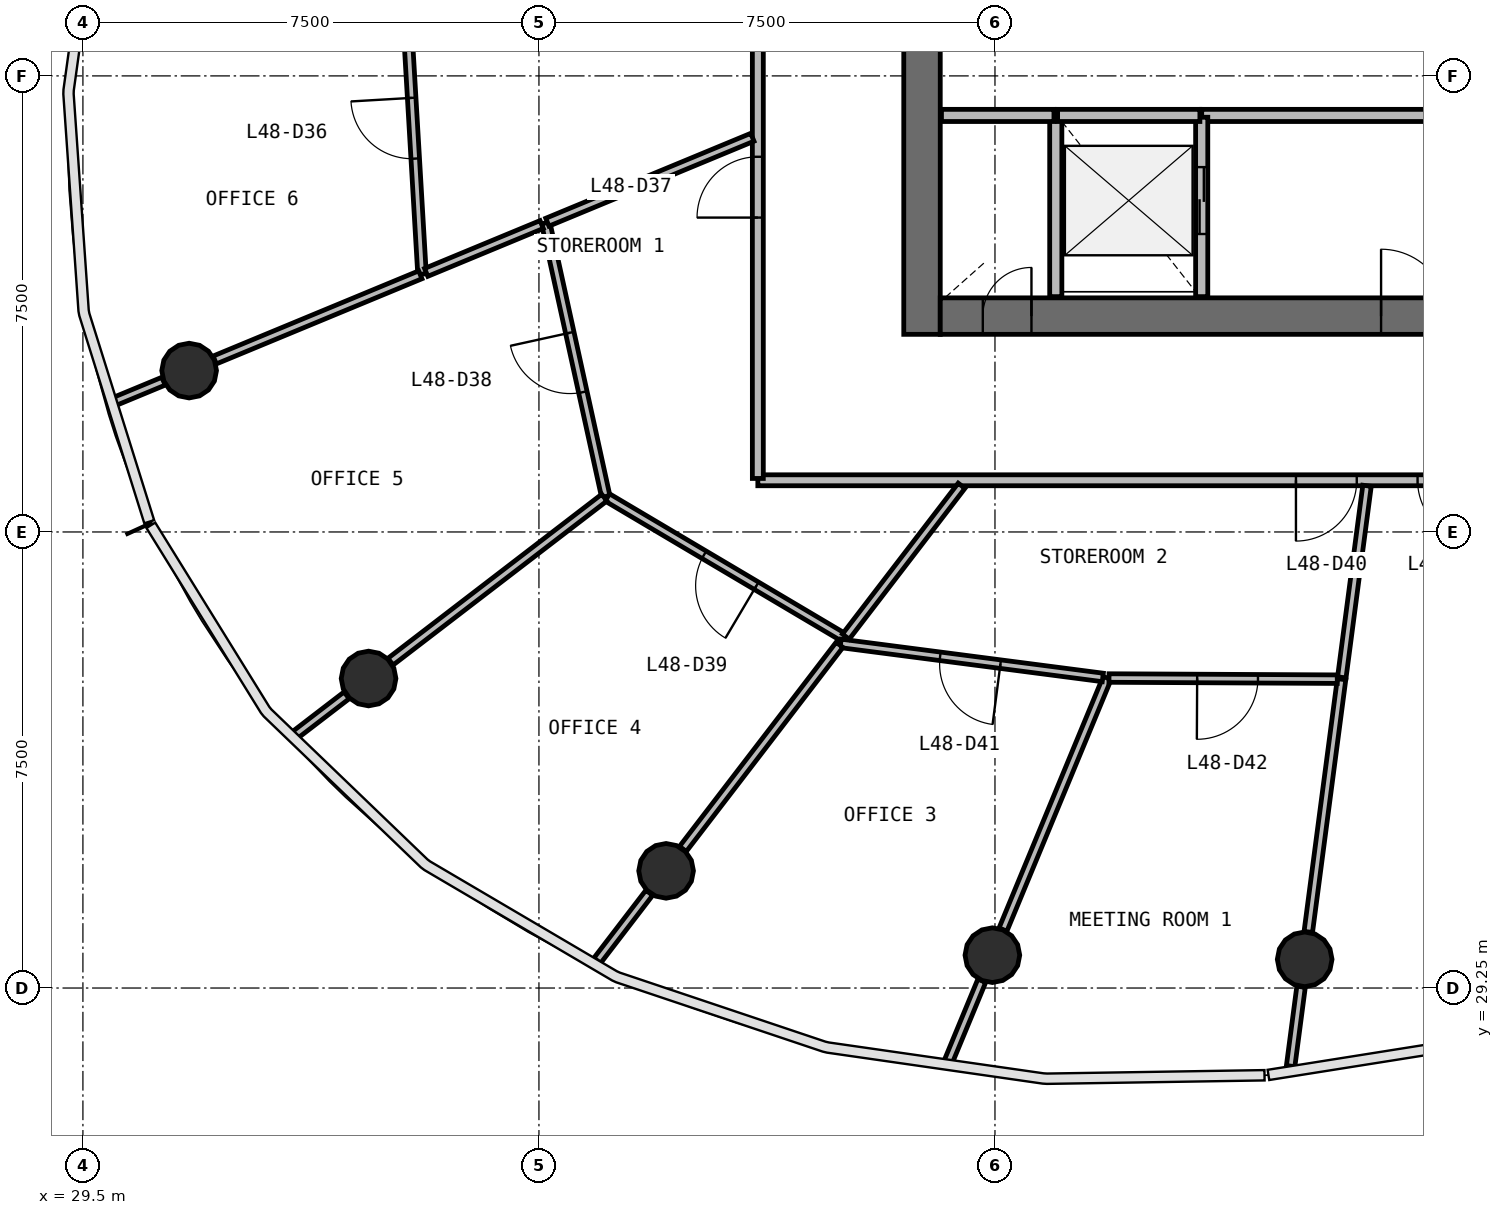
"""IFC4 building model, lengths in metres.
Left out: names, types, materials, properties, quantities, classifications, styles, units other than length and angle.
Written with IfcOpenShell. Run it as: python <this file> out.ifc"""

import sys

from ifc_helpers import new_model, si_unit, direction, frame, frame_2d, origin, origin_2d, place, context, subcontext, project, spatial, rectangle, circle, extrude, source, transform, mapped, element, fill, save


model = new_model("IFC4")
c1 = context("Model", 3, precision=1e-05, world=origin(), true_north=direction((0.0, 1.0)))
c2 = subcontext(c1, "Body", "Model", "MODEL_VIEW")
j1 = project(units=[si_unit("LENGTHUNIT", "METRE"), si_unit("PLANEANGLEUNIT", "RADIAN")], contexts=[c1])
p1 = place(None, origin())
s1 = spatial("IfcSite", under=j1, at=p1, CompositionType="ELEMENT")
p2 = place(p1, origin())
s2 = spatial("IfcBuilding", under=s1, at=p2, CompositionType="ELEMENT")
p3 = place(p2, frame((0.0, 0.0, 199.4)))
s3 = spatial("IfcBuildingStorey", under=s2, at=p3, CompositionType="ELEMENT", Elevation=199.4)
p4 = place(p3, frame((43.3, 56.0, 0.0), z_axis=(0.0, 0.0, 1.0), x_axis=(0.0, -1.0, 0.0)))
e1 = element("IfcWall", 1, at=p4, inside=s3, PredefinedType="SHEAR", context=c2, shape_type="SweptSolid", body=[
    extrude(rectangle(XDim=16.0, YDim=0.6, at=frame_2d((8.0, 0.0))), origin(), (0.0, 0.0, 1.0), 3.9),
])
p5 = place(p4, frame((7.1, 0.0, 0.0)))
e2 = element("IfcOpeningElement", 2, at=p5, cuts=e1, PredefinedType="OPENING", context=c2, shape_type="SweptSolid", body=[
    extrude(rectangle(XDim=1.8, YDim=2.1, at=frame_2d((0.9, 1.05))), frame((0.0, 0.31, 0.0), z_axis=(0.0, -1.0, 0.0), x_axis=(1.0, 0.0, 0.0)), (0.0, 0.0, 1.0), 0.62),
])
p6 = place(p3, frame((43.6, 40.3, 0.0), z_axis=(0.0, 0.0, 1.0), x_axis=(1.0, 0.0, 0.0)))
e3 = element("IfcWall", 3, at=p6, inside=s3, PredefinedType="SHEAR", context=c2, shape_type="SweptSolid", body=[
    extrude(rectangle(XDim=16.8, YDim=0.6, at=frame_2d((8.4, 0.0))), origin(), (0.0, 0.0, 1.0), 3.9),
])
p7 = place(p6, frame((10.3, 0.0, 0.0)))
e4 = element("IfcOpeningElement", 4, at=p7, cuts=e3, PredefinedType="OPENING", context=c2, shape_type="SweptSolid", body=[
    extrude(rectangle(XDim=1.2, YDim=2.1, at=frame_2d((0.6, 1.05))), frame((0.0, 0.31, 0.0), z_axis=(0.0, -1.0, 0.0), x_axis=(1.0, 0.0, 0.0)), (0.0, 0.0, 1.0), 0.62),
])
p8 = place(p6, frame((7.25, 0.0, 0.0)))
e5 = element("IfcOpeningElement", 5, at=p8, cuts=e3, PredefinedType="OPENING", context=c2, shape_type="SweptSolid", body=[
    extrude(rectangle(XDim=1.1, YDim=2.1, at=frame_2d((0.55, 1.05))), frame((0.0, 0.31, 0.0), z_axis=(0.0, -1.0, 0.0), x_axis=(1.0, 0.0, 0.0)), (0.0, 0.0, 1.0), 0.62),
])
p9 = place(p6, frame((0.7, 0.0, 0.0)))
e6 = element("IfcOpeningElement", 6, at=p9, cuts=e3, PredefinedType="OPENING", context=c2, shape_type="SweptSolid", body=[
    extrude(rectangle(XDim=0.8, YDim=2.1, at=frame_2d((0.4, 1.05))), frame((0.0, 0.31, 0.0), z_axis=(0.0, -1.0, 0.0), x_axis=(1.0, 0.0, 0.0)), (0.0, 0.0, 1.0), 0.62),
])
m1 = source(origin(), c2, "Body", "SweptSolid", [
    extrude(circle(Radius=0.45, at=origin_2d()), origin(), (0.0, 0.0, 1.0), 3.9),
])
for number, where, z_axis, x_axis in (
    (7, (31.247, 39.404, 0.0), (0.0, 0.0, 1.0), (1.0, 0.0, 0.0)),
    (8, (34.198, 34.34, 0.0), (0.0, 0.0, 1.0), (1.0, 0.0, 0.0)),
    (9, (39.091, 31.177, 0.0), (0.0, 0.0, 1.0), (1.0, 0.0, 0.0)),
    (10, (44.457, 29.79, 0.0), (0.0, 0.0, 1.0), (1.0, 0.0, 0.0)),
    (11, (49.594, 29.722, 0.0), (0.0, 0.0, 1.0), (1.0, 0.0, 0.0)),
):
    element("IfcColumn", number, at=place(p3, frame(where, z_axis=z_axis, x_axis=x_axis)), inside=s3, PredefinedType="COLUMN", context=c2, shape_type="MappedRepresentation", body=[
        mapped(m1, transform((0.0, 0.0, 0.0), scale=1.0)),
    ])
p10 = place(p3, frame((52.7, 43.6, 0.0), z_axis=(0.0, 0.0, 1.0), x_axis=(-1.0, 0.0, 0.0)))
e12 = element("IfcWall", 12, at=p10, inside=s3, PredefinedType="SOLIDWALL", context=c2, shape_type="SweptSolid", body=[
    extrude(rectangle(XDim=4.8, YDim=0.2, at=frame_2d((2.4, 0.0))), origin(), (0.0, 0.0, 1.0), 3.58),
])
p11 = place(p3, frame((45.5, 43.6, 0.0), z_axis=(0.0, 0.0, 1.0), x_axis=(0.0, -1.0, 0.0)))
e13 = element("IfcWall", 13, at=p11, inside=s3, PredefinedType="SOLIDWALL", context=c2, shape_type="SweptSolid", body=[
    extrude(rectangle(XDim=2.98, YDim=0.2, at=frame_2d((1.49, 0.0))), origin(), (0.0, 0.0, 1.0), 3.58),
])
p12 = place(p3, frame((47.9, 40.62, 0.0), z_axis=(0.0, 0.0, 1.0), x_axis=(0.0, 1.0, 0.0)))
e14 = element("IfcWall", 14, at=p12, inside=s3, PredefinedType="SOLIDWALL", context=c2, shape_type="SweptSolid", body=[
    extrude(rectangle(XDim=2.95, YDim=0.2, at=frame_2d((1.475, 0.0))), origin(), (0.0, 0.0, 1.0), 3.58),
])
p13 = place(p12, frame((1.03, 0.0, 0.0)))
e15 = element("IfcOpeningElement", 15, at=p13, cuts=e14, PredefinedType="OPENING", context=c2, shape_type="SweptSolid", body=[
    extrude(rectangle(XDim=1.1, YDim=2.1, at=frame_2d((0.55, 1.05))), frame((0.0, 0.11, 0.0), z_axis=(0.0, -1.0, 0.0), x_axis=(1.0, 0.0, 0.0)), (0.0, 0.0, 1.0), 0.22),
])
p14 = place(p3, frame((47.87, 43.6, 0.0), z_axis=(0.0, 0.0, 1.0), x_axis=(-1.0, 0.0, 0.0)))
e16 = element("IfcWall", 16, at=p14, inside=s3, PredefinedType="SOLIDWALL", context=c2, shape_type="SweptSolid", body=[
    extrude(rectangle(XDim=2.34, YDim=0.2, at=frame_2d((1.17, 0.0))), origin(), (0.0, 0.0, 1.0), 3.58),
])
p15 = place(p3, frame((45.47, 43.6, 0.0), z_axis=(0.0, 0.0, 1.0), x_axis=(-1.0, 0.0, 0.0)))
e17 = element("IfcWall", 17, at=p15, inside=s3, PredefinedType="SOLIDWALL", context=c2, shape_type="SweptSolid", body=[
    extrude(rectangle(XDim=1.85, YDim=0.2, at=frame_2d((0.925, 0.0))), origin(), (0.0, 0.0, 1.0), 3.58),
])
p16 = place(p3, frame((63.4, 37.6, 0.0), z_axis=(0.0, 0.0, 1.0), x_axis=(-1.0, 0.0, 0.0)))
e18 = element("IfcWall", 18, at=p16, inside=s3, PredefinedType="PARTITIONING", context=c2, shape_type="SweptSolid", body=[
    extrude(rectangle(XDim=22.8, YDim=0.18, at=frame_2d((11.4, 0.0))), origin(), (0.0, 0.0, 1.0), 2.88),
])
p17 = place(p16, frame((12.95, 0.0, 0.0)))
e19 = element("IfcOpeningElement", 19, at=p17, cuts=e18, PredefinedType="OPENING", context=c2, shape_type="SweptSolid", body=[
    extrude(rectangle(XDim=1.0, YDim=2.1, at=frame_2d((0.5, 1.05))), frame((0.0, 0.1, 0.0), z_axis=(0.0, -1.0, 0.0), x_axis=(1.0, 0.0, 0.0)), (0.0, 0.0, 1.0), 0.2),
])
p18 = place(p16, frame((10.95, 0.0, 0.0)))
e20 = element("IfcOpeningElement", 20, at=p18, cuts=e18, PredefinedType="OPENING", context=c2, shape_type="SweptSolid", body=[
    extrude(rectangle(XDim=1.0, YDim=2.1, at=frame_2d((0.5, 1.05))), frame((0.0, 0.1, 0.0), z_axis=(0.0, -1.0, 0.0), x_axis=(1.0, 0.0, 0.0)), (0.0, 0.0, 1.0), 0.2),
])
p19 = place(p16, frame((5.75, 0.0, 0.0)))
e21 = element("IfcOpeningElement", 21, at=p19, cuts=e18, PredefinedType="OPENING", context=c2, shape_type="SweptSolid", body=[
    extrude(rectangle(XDim=1.0, YDim=2.1, at=frame_2d((0.5, 1.05))), frame((0.0, 0.1, 0.0), z_axis=(0.0, -1.0, 0.0), x_axis=(1.0, 0.0, 0.0)), (0.0, 0.0, 1.0), 0.2),
])
p20 = place(p3, frame((40.6, 37.63, 0.0), z_axis=(0.0, 0.0, 1.0), x_axis=(0.0, 1.0, 0.0)))
e22 = element("IfcWall", 22, at=p20, inside=s3, PredefinedType="PARTITIONING", context=c2, shape_type="SweptSolid", body=[
    extrude(rectangle(XDim=20.74, YDim=0.18, at=frame_2d((10.37, 0.0))), origin(), (0.0, 0.0, 1.0), 2.88),
])
p21 = place(p20, frame((9.89, 0.0, 0.0)))
e23 = element("IfcOpeningElement", 23, at=p21, cuts=e22, PredefinedType="OPENING", context=c2, shape_type="SweptSolid", body=[
    extrude(rectangle(XDim=1.0, YDim=2.1, at=frame_2d((0.5, 1.05))), frame((0.0, 0.1, 0.0), z_axis=(0.0, -1.0, 0.0), x_axis=(1.0, 0.0, 0.0)), (0.0, 0.0, 1.0), 0.2),
])
p22 = place(p20, frame((4.29, 0.0, 0.0)))
e24 = element("IfcOpeningElement", 24, at=p22, cuts=e22, PredefinedType="OPENING", context=c2, shape_type="SweptSolid", body=[
    extrude(rectangle(XDim=1.0, YDim=2.1, at=frame_2d((0.5, 1.05))), frame((0.0, 0.1, 0.0), z_axis=(0.0, -1.0, 0.0), x_axis=(1.0, 0.0, 0.0)), (0.0, 0.0, 1.0), 0.2),
])
p23 = place(p3, frame((35.077, 40.99, 0.0), z_axis=(0.0, 0.0, 1.0), x_axis=(-0.058604596276, 0.998281273638, 0.0)))
e25 = element("IfcWall", 25, at=p23, inside=s3, PredefinedType="PARTITIONING", context=c2, shape_type="SweptSolid", body=[
    extrude(rectangle(XDim=4.753, YDim=0.14, at=frame_2d((2.376, 0.0))), origin(), (0.0, 0.0, 1.0), 2.88),
])
p24 = place(p23, frame((1.903, 0.0, 0.0)))
e26 = element("IfcOpeningElement", 26, at=p24, cuts=e25, PredefinedType="OPENING", context=c2, shape_type="SweptSolid", body=[
    extrude(rectangle(XDim=1.0, YDim=2.1, at=frame_2d((0.5, 1.05))), frame((0.0, 0.08, 0.0), z_axis=(0.0, -1.0, 0.0), x_axis=(1.0, 0.0, 0.0)), (0.0, 0.0, 1.0), 0.16),
])
p25 = place(p3, frame((38.099, 37.333, 0.0), z_axis=(0.0, 0.0, 1.0), x_axis=(-0.214477585578, 0.976728910847, 0.0)))
e27 = element("IfcWall", 27, at=p25, inside=s3, PredefinedType="PARTITIONING", context=c2, shape_type="SweptSolid", body=[
    extrude(rectangle(XDim=4.607, YDim=0.14, at=frame_2d((2.303, 0.0))), origin(), (0.0, 0.0, 1.0), 2.88),
])
p26 = place(p25, frame((1.757, 0.0, 0.0)))
e28 = element("IfcOpeningElement", 28, at=p26, cuts=e27, PredefinedType="OPENING", context=c2, shape_type="SweptSolid", body=[
    extrude(rectangle(XDim=1.0, YDim=2.1, at=frame_2d((0.5, 1.05))), frame((0.0, 0.08, 0.0), z_axis=(0.0, -1.0, 0.0), x_axis=(1.0, 0.0, 0.0)), (0.0, 0.0, 1.0), 0.16),
])
p27 = place(p3, frame((42.029, 35.005, 0.0), z_axis=(0.0, 0.0, 1.0), x_axis=(-0.860328238393, 0.509740445937, 0.0)))
e29 = element("IfcWall", 29, at=p27, inside=s3, PredefinedType="PARTITIONING", context=c2, shape_type="SweptSolid", body=[
    extrude(rectangle(XDim=4.538, YDim=0.14, at=frame_2d((2.269, 0.0))), origin(), (0.0, 0.0, 1.0), 2.88),
])
p28 = place(p27, frame((1.688, 0.0, 0.0)))
e30 = element("IfcOpeningElement", 30, at=p28, cuts=e29, PredefinedType="OPENING", context=c2, shape_type="SweptSolid", body=[
    extrude(rectangle(XDim=1.0, YDim=2.1, at=frame_2d((0.5, 1.05))), frame((0.0, 0.08, 0.0), z_axis=(0.0, -1.0, 0.0), x_axis=(1.0, 0.0, 0.0)), (0.0, 0.0, 1.0), 0.16),
])
p29 = place(p3, frame((46.345, 34.348, 0.0), z_axis=(0.0, 0.0, 1.0), x_axis=(-0.382698450862, -0.923873311503, 0.0)))
e31 = element("IfcWall", 31, at=p29, inside=s3, PredefinedType="PARTITIONING", context=c2, shape_type="SweptSolid", body=[
    extrude(rectangle(XDim=4.478, YDim=0.14, at=frame_2d((2.239, 0.0))), origin(), (0.0, 0.0, 1.0), 2.88),
])
p30 = place(p3, frame((38.075, 37.315, 0.0), z_axis=(0.0, 0.0, 1.0), x_axis=(-0.793368713958, -0.608741393132, 0.0)))
e32 = element("IfcWall", 32, at=p30, inside=s3, PredefinedType="PARTITIONING", context=c2, shape_type="SweptSolid", body=[
    extrude(rectangle(XDim=4.432, YDim=0.14, at=frame_2d((2.216, 0.0))), origin(), (0.0, 0.0, 1.0), 2.88),
])
p31 = place(p3, frame((46.273, 34.357, 0.0), z_axis=(0.0, 0.0, 1.0), x_axis=(-0.991661359213, 0.128871054326, 0.0)))
e33 = element("IfcWall", 33, at=p31, inside=s3, PredefinedType="PARTITIONING", context=c2, shape_type="SweptSolid", body=[
    extrude(rectangle(XDim=4.348, YDim=0.14, at=frame_2d((2.174, 0.0))), origin(), (0.0, 0.0, 1.0), 2.88),
])
p32 = place(p31, frame((1.698, 0.0, 0.0)))
e34 = element("IfcOpeningElement", 34, at=p32, cuts=e33, PredefinedType="OPENING", context=c2, shape_type="SweptSolid", body=[
    extrude(rectangle(XDim=1.0, YDim=2.1, at=frame_2d((0.5, 1.05))), frame((0.0, 0.08, 0.0), z_axis=(0.0, -1.0, 0.0), x_axis=(1.0, 0.0, 0.0)), (0.0, 0.0, 1.0), 0.16),
])
p33 = place(p3, frame((41.944, 34.894, 0.0), z_axis=(0.0, 0.0, 1.0), x_axis=(-0.608790069617, -0.793331362758, 0.0)))
e35 = element("IfcWall", 35, at=p33, inside=s3, PredefinedType="PARTITIONING", context=c2, shape_type="SweptSolid", body=[
    extrude(rectangle(XDim=4.231, YDim=0.14, at=frame_2d((2.115, 0.0))), origin(), (0.0, 0.0, 1.0), 2.88),
])
p34 = place(p3, frame((50.2, 34.329, 0.0), z_axis=(0.0, 0.0, 1.0), x_axis=(-0.13056900495, -0.991439224031, 0.0)))
e36 = element("IfcWall", 36, at=p34, inside=s3, PredefinedType="PARTITIONING", context=c2, shape_type="SweptSolid", body=[
    extrude(rectangle(XDim=4.192, YDim=0.14, at=frame_2d((2.096, 0.0))), origin(), (0.0, 0.0, 1.0), 2.88),
])
p35 = place(p3, frame((50.13, 34.329, 0.0), z_axis=(0.0, 0.0, 1.0), x_axis=(-0.999987464445, 0.005007090308, 0.0)))
e37 = element("IfcWall", 37, at=p35, inside=s3, PredefinedType="PARTITIONING", context=c2, shape_type="SweptSolid", body=[
    extrude(rectangle(XDim=3.754, YDim=0.14, at=frame_2d((1.877, 0.0))), origin(), (0.0, 0.0, 1.0), 2.88),
])
p36 = place(p35, frame((1.304, 0.0, 0.0)))
e38 = element("IfcOpeningElement", 38, at=p36, cuts=e37, PredefinedType="OPENING", context=c2, shape_type="SweptSolid", body=[
    extrude(rectangle(XDim=1.0, YDim=2.1, at=frame_2d((0.5, 1.05))), frame((0.0, 0.08, 0.0), z_axis=(0.0, -1.0, 0.0), x_axis=(1.0, 0.0, 0.0)), (0.0, 0.0, 1.0), 0.16),
])
p37 = place(p3, frame((40.51, 43.241, 0.0), z_axis=(0.0, 0.0, 1.0), x_axis=(-0.923876577678, -0.382690565886, 0.0)))
e39 = element("IfcWall", 39, at=p37, inside=s3, PredefinedType="PARTITIONING", context=c2, shape_type="SweptSolid", body=[
    extrude(rectangle(XDim=3.649, YDim=0.14, at=frame_2d((1.825, 0.0))), origin(), (0.0, 0.0, 1.0), 2.88),
])
p38 = place(p3, frame((35.049, 40.979, 0.0), z_axis=(0.0, 0.0, 1.0), x_axis=(-0.923881901713, -0.382677712555, 0.0)))
e40 = element("IfcWall", 40, at=p38, inside=s3, PredefinedType="PARTITIONING", context=c2, shape_type="SweptSolid", body=[
    extrude(rectangle(XDim=3.661, YDim=0.14, at=frame_2d((1.83, 0.0))), origin(), (0.0, 0.0, 1.0), 2.88),
])
p39 = place(p3, frame((50.619, 37.51, 0.0), z_axis=(0.0, 0.0, 1.0), x_axis=(-0.130488286991, -0.991449850955, 0.0)))
e41 = element("IfcWall", 41, at=p39, inside=s3, PredefinedType="PARTITIONING", context=c2, shape_type="SweptSolid", body=[
    extrude(rectangle(XDim=3.179, YDim=0.14, at=frame_2d((1.589, 0.0))), origin(), (0.0, 0.0, 1.0), 2.88),
])
p40 = place(p3, frame((43.951, 37.51, 0.0), z_axis=(0.0, 0.0, 1.0), x_axis=(-0.60874451787, -0.793366316378, 0.0)))
e42 = element("IfcWall", 42, at=p40, inside=s3, PredefinedType="PARTITIONING", context=c2, shape_type="SweptSolid", body=[
    extrude(rectangle(XDim=3.127, YDim=0.14, at=frame_2d((1.564, 0.0))), origin(), (0.0, 0.0, 1.0), 2.88),
])
p41 = place(p3, frame((37.045, 41.805, 0.0), z_axis=(0.0, 0.0, 1.0), x_axis=(-0.92387935321, -0.382683865235, 0.0)))
e43 = element("IfcWall", 43, at=p41, inside=s3, PredefinedType="PARTITIONING", context=c2, shape_type="SweptSolid", body=[
    extrude(rectangle(XDim=2.056, YDim=0.14, at=frame_2d((1.028, 0.0))), origin(), (0.0, 0.0, 1.0), 2.88),
])
p42 = place(p3, frame((44.283, 29.37, 0.0), z_axis=(0.0, 0.0, 1.0), x_axis=(-0.382652525483, -0.923892333955, 0.0)))
e44 = element("IfcWall", 44, at=p42, inside=s3, PredefinedType="PARTITIONING", context=c2, shape_type="SweptSolid", body=[
    extrude(rectangle(XDim=1.458, YDim=0.14, at=frame_2d((0.729, 0.0))), origin(), (0.0, 0.0, 1.0), 2.88),
])
p43 = place(p3, frame((38.814, 30.816, 0.0), z_axis=(0.0, 0.0, 1.0), x_axis=(-0.608686646562, -0.793410717281, 0.0)))
e45 = element("IfcWall", 45, at=p43, inside=s3, PredefinedType="PARTITIONING", context=c2, shape_type="SweptSolid", body=[
    extrude(rectangle(XDim=1.406, YDim=0.14, at=frame_2d((0.703, 0.0))), origin(), (0.0, 0.0, 1.0), 2.88),
])
p44 = place(p3, frame((49.534, 29.271, 0.0), z_axis=(0.0, 0.0, 1.0), x_axis=(-0.13056005306, -0.991440402921, 0.0)))
e46 = element("IfcWall", 46, at=p44, inside=s3, PredefinedType="PARTITIONING", context=c2, shape_type="SweptSolid", body=[
    extrude(rectangle(XDim=1.316, YDim=0.14, at=frame_2d((0.658, 0.0))), origin(), (0.0, 0.0, 1.0), 2.88),
])
p45 = place(p3, frame((33.837, 34.063, 0.0), z_axis=(0.0, 0.0, 1.0), x_axis=(-0.793452471415, -0.608632217029, 0.0)))
e47 = element("IfcWall", 47, at=p45, inside=s3, PredefinedType="PARTITIONING", context=c2, shape_type="SweptSolid", body=[
    extrude(rectangle(XDim=1.073, YDim=0.14, at=frame_2d((0.536, 0.0))), origin(), (0.0, 0.0, 1.0), 2.88),
])
p46 = place(p3, frame((30.826, 39.23, 0.0), z_axis=(0.0, 0.0, 1.0), x_axis=(-0.923854619105, -0.382743573112, 0.0)))
e48 = element("IfcWall", 48, at=p46, inside=s3, PredefinedType="PARTITIONING", context=c2, shape_type="SweptSolid", body=[
    extrude(rectangle(XDim=0.917, YDim=0.14, at=frame_2d((0.458, 0.0))), origin(), (0.0, 0.0, 1.0), 2.88),
])
m2 = source(origin(), c2, "Body", "SweptSolid", [
    extrude(rectangle(XDim=1.1, YDim=2.1, at=frame_2d((0.55, 1.05))), frame((0.0, 0.025, 0.0), z_axis=(0.0, -1.0, 0.0), x_axis=(1.0, 0.0, 0.0)), (0.0, 0.0, 1.0), 0.05),
])
p47 = place(p13, origin())
e49 = element("IfcDoor", 49, at=p47, inside=s3, OperationType="DOUBLE_DOOR_SLIDING", PredefinedType="USERDEFINED", context=c2, shape_type="MappedRepresentation", body=[
    mapped(m2, transform((0.0, 0.0, 0.0), scale=1.0)),
])
fill(e15, e49)
m3 = source(origin(), c2, "Body", "SweptSolid", [
    extrude(rectangle(XDim=1.1, YDim=2.1, at=frame_2d((0.55, 1.05))), frame((0.0, 0.025, 0.0), z_axis=(0.0, -1.0, 0.0), x_axis=(1.0, 0.0, 0.0)), (0.0, 0.0, 1.0), 0.05),
])
p48 = place(p8, origin())
e50 = element("IfcDoor", 50, at=p48, inside=s3, OperationType="SINGLE_SWING_LEFT", PredefinedType="DOOR", context=c2, shape_type="MappedRepresentation", body=[
    mapped(m3, transform((0.0, 0.0, 0.0), scale=1.0)),
])
fill(e5, e50)
m4 = source(origin(), c2, "Body", "SweptSolid", [
    extrude(rectangle(XDim=0.8, YDim=2.1, at=frame_2d((0.4, 1.05))), frame((0.0, 0.025, 0.0), z_axis=(0.0, -1.0, 0.0), x_axis=(1.0, 0.0, 0.0)), (0.0, 0.0, 1.0), 0.05),
])
p49 = place(p9, origin())
e51 = element("IfcDoor", 51, at=p49, inside=s3, OperationType="SINGLE_SWING_RIGHT", PredefinedType="DOOR", context=c2, shape_type="MappedRepresentation", body=[
    mapped(m4, transform((0.0, 0.0, 0.0), scale=1.0)),
])
fill(e6, e51)
m5 = source(origin(), c2, "Body", "SweptSolid", [
    extrude(rectangle(XDim=1.0, YDim=2.1, at=frame_2d((0.5, 1.05))), frame((0.0, 0.025, 0.0), z_axis=(0.0, -1.0, 0.0), x_axis=(1.0, 0.0, 0.0)), (0.0, 0.0, 1.0), 0.05),
])
p50 = place(p24, origin())
e52 = element("IfcDoor", 52, at=p50, inside=s3, OperationType="SINGLE_SWING_RIGHT", PredefinedType="DOOR", context=c2, shape_type="MappedRepresentation", body=[
    mapped(m5, transform((0.0, 0.0, 0.0), scale=1.0)),
])
fill(e26, e52)
p51 = place(p22, origin())
e53 = element("IfcDoor", 53, at=p51, inside=s3, OperationType="SINGLE_SWING_LEFT", PredefinedType="DOOR", context=c2, shape_type="MappedRepresentation", body=[
    mapped(m5, transform((0.0, 0.0, 0.0), scale=1.0)),
])
fill(e24, e53)
p52 = place(p26, origin())
e54 = element("IfcDoor", 54, at=p52, inside=s3, OperationType="SINGLE_SWING_RIGHT", PredefinedType="DOOR", context=c2, shape_type="MappedRepresentation", body=[
    mapped(m5, transform((0.0, 0.0, 0.0), scale=1.0)),
])
fill(e28, e54)
p53 = place(p28, origin())
e55 = element("IfcDoor", 55, at=p53, inside=s3, OperationType="SINGLE_SWING_LEFT", PredefinedType="DOOR", context=c2, shape_type="MappedRepresentation", body=[
    mapped(m5, transform((0.0, 0.0, 0.0), scale=1.0)),
])
fill(e30, e55)
p54 = place(p17, origin())
e56 = element("IfcDoor", 56, at=p54, inside=s3, OperationType="SINGLE_SWING_RIGHT", PredefinedType="DOOR", context=c2, shape_type="MappedRepresentation", body=[
    mapped(m5, transform((0.0, 0.0, 0.0), scale=1.0)),
])
fill(e19, e56)
p55 = place(p32, origin())
e57 = element("IfcDoor", 57, at=p55, inside=s3, OperationType="SINGLE_SWING_LEFT", PredefinedType="DOOR", context=c2, shape_type="MappedRepresentation", body=[
    mapped(m5, transform((0.0, 0.0, 0.0), scale=1.0)),
])
fill(e34, e57)
p56 = place(p36, origin())
e58 = element("IfcDoor", 58, at=p56, inside=s3, OperationType="SINGLE_SWING_RIGHT", PredefinedType="DOOR", context=c2, shape_type="MappedRepresentation", body=[
    mapped(m5, transform((0.0, 0.0, 0.0), scale=1.0)),
])
fill(e38, e58)
p57 = place(p18, origin())
e59 = element("IfcDoor", 59, at=p57, inside=s3, OperationType="SINGLE_SWING_LEFT", PredefinedType="DOOR", context=c2, shape_type="MappedRepresentation", body=[
    mapped(m5, transform((0.0, 0.0, 0.0), scale=1.0)),
])
fill(e20, e59)
save(model, sys.argv[1])
